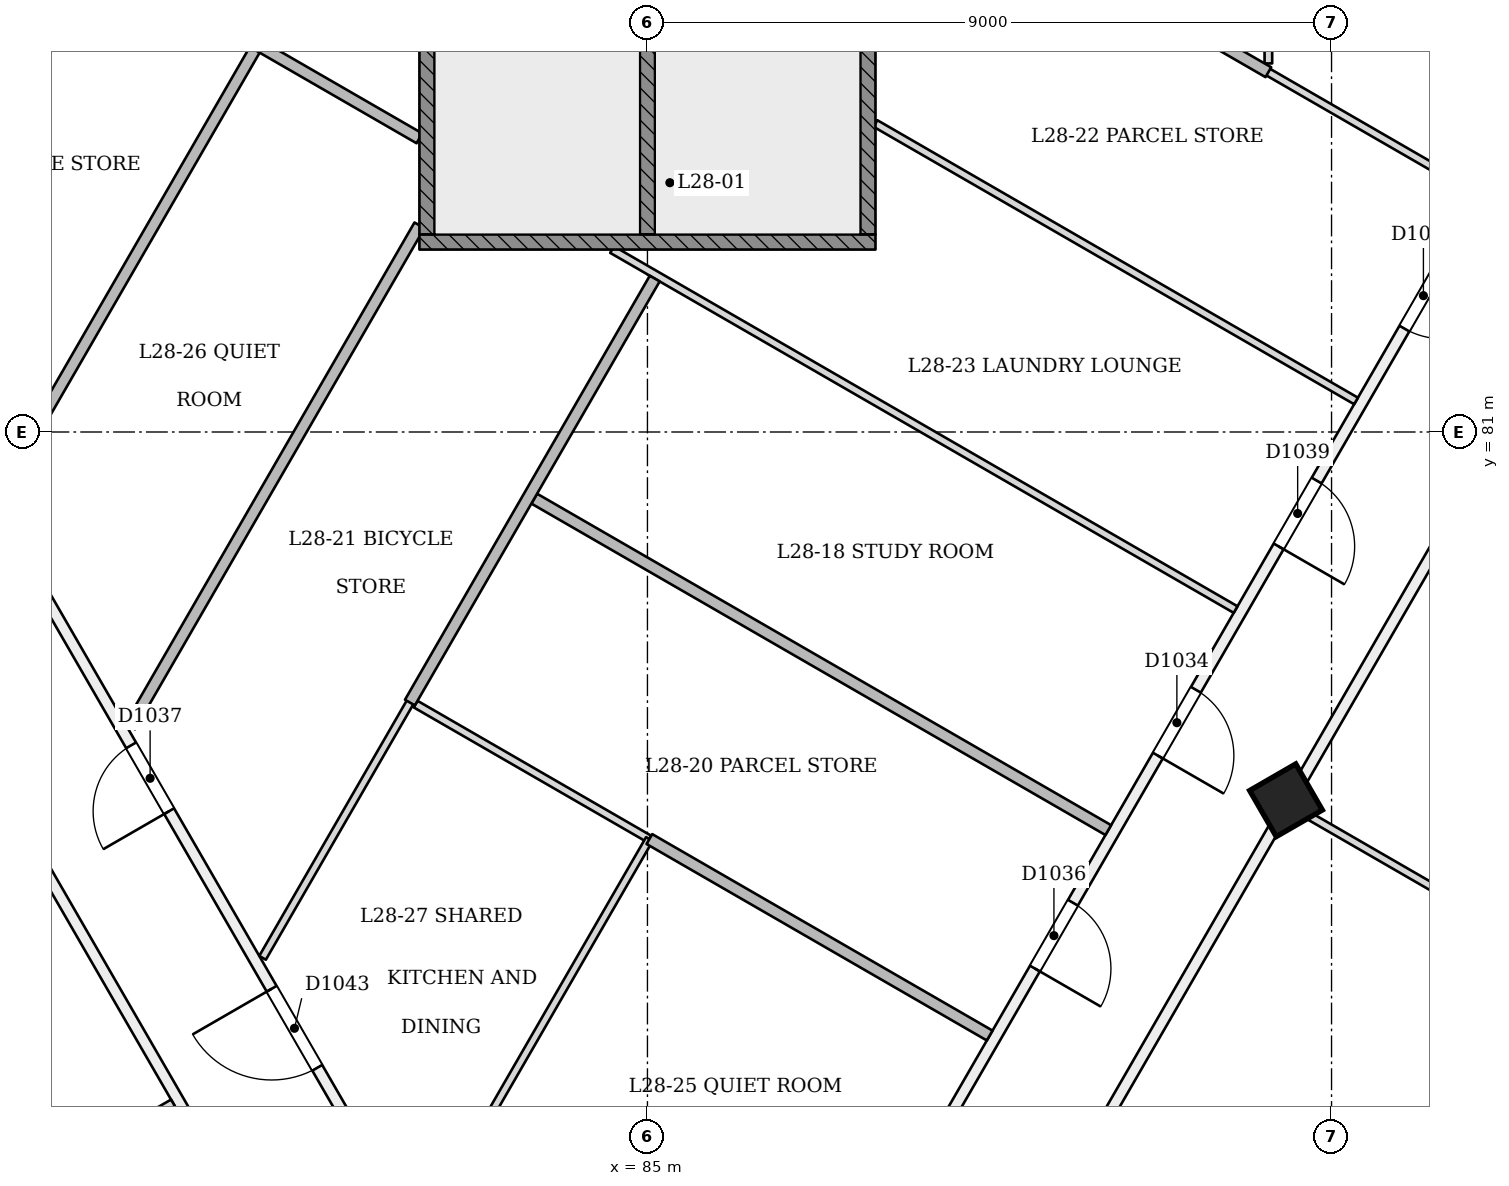
"""IFC4 building model, lengths in metres.
Left out: names, types, materials, properties, quantities, classifications, styles, units other than length and angle.
Written with IfcOpenShell. Run it as: python <this file> out.ifc"""

import sys

from ifc_helpers import new_model, si_unit, direction, frame, frame_2d, origin, origin_2d, place, context, subcontext, project, spatial, rectangle, extrude, element, fill, save


model = new_model("IFC4")
c1 = context("Model", 3, precision=1e-05, world=origin(), true_north=direction((0.0, 1.0)))
c2 = subcontext(c1, "Body", "Model", "MODEL_VIEW")
j1 = project(units=[si_unit("LENGTHUNIT", "METRE"), si_unit("PLANEANGLEUNIT", "RADIAN")], contexts=[c1])
p1 = place(None, origin())
s1 = spatial("IfcSite", under=j1, at=p1, CompositionType="ELEMENT")
p2 = place(p1, origin())
s2 = spatial("IfcBuilding", under=s1, at=p2, CompositionType="ELEMENT")
p3 = place(p2, frame((0.0, 0.0, 111.6)))
s3 = spatial("IfcBuildingStorey", under=s2, at=p3, CompositionType="ELEMENT", Elevation=111.6)
p4 = place(p3, frame((93.428, 76.108, -0.021), z_axis=(-0.02215519141, 0.038415882353, 0.999016199807), x_axis=(-0.50065279292, -0.865364153162, 0.02217348332)))
e1 = element("IfcColumn", 1, at=p4, inside=s3, PredefinedType="COLUMN", context=c2, shape_type="SweptSolid", body=[
    extrude(rectangle(XDim=0.7, YDim=0.7, at=origin_2d()), origin(), (0.0, 0.0, 1.0), 3.604),
])
p5 = place(p3, frame((99.716, 90.6, 0.0), z_axis=(0.0, 0.0, 1.0), x_axis=(-0.500001331159, -0.866024635238, 0.0)))
e2 = element("IfcWall", 2, at=p5, inside=s3, PredefinedType="PARTITIONING", context=c2, shape_type="SweptSolid", body=[
    extrude(rectangle(XDim=29.302, YDim=0.15, at=frame_2d((14.651, 0.0))), origin(), (0.0, 0.0, 1.0), 3.1),
])
p6 = place(p5, frame((2.192, 0.0, 0.0)))
e3 = element("IfcOpeningElement", 3, at=p6, cuts=e2, PredefinedType="OPENING", context=c2, shape_type="SweptSolid", body=[
    extrude(rectangle(XDim=0.9, YDim=2.1, at=frame_2d((0.45, 1.05))), frame((0.0, 0.085, 0.0), z_axis=(0.0, -1.0, 0.0), x_axis=(1.0, 0.0, 0.0)), (0.0, 0.0, 1.0), 0.171),
])
p7 = place(p5, frame((5.182, 0.0, 0.0)))
e4 = element("IfcOpeningElement", 4, at=p7, cuts=e2, PredefinedType="OPENING", context=c2, shape_type="SweptSolid", body=[
    extrude(rectangle(XDim=0.9, YDim=2.1, at=frame_2d((0.45, 1.05))), frame((0.0, 0.085, 0.0), z_axis=(0.0, -1.0, 0.0), x_axis=(1.0, 0.0, 0.0)), (0.0, 0.0, 1.0), 0.171),
])
p8 = place(p5, frame((15.001, 0.0, 0.0)))
e5 = element("IfcOpeningElement", 5, at=p8, cuts=e2, PredefinedType="OPENING", context=c2, shape_type="SweptSolid", body=[
    extrude(rectangle(XDim=1.0, YDim=2.1, at=frame_2d((0.5, 1.05))), frame((0.0, 0.085, 0.0), z_axis=(0.0, -1.0, 0.0), x_axis=(1.0, 0.0, 0.0)), (0.0, 0.0, 1.0), 0.171),
])
p9 = place(p5, frame((18.236, 0.0, 0.0)))
e6 = element("IfcOpeningElement", 6, at=p9, cuts=e2, PredefinedType="OPENING", context=c2, shape_type="SweptSolid", body=[
    extrude(rectangle(XDim=1.0, YDim=2.1, at=frame_2d((0.5, 1.05))), frame((0.0, 0.085, 0.0), z_axis=(0.0, -1.0, 0.0), x_axis=(1.0, 0.0, 0.0)), (0.0, 0.0, 1.0), 0.171),
])
p10 = place(p5, frame((8.514, 0.0, 0.0)))
e7 = element("IfcOpeningElement", 7, at=p10, cuts=e2, PredefinedType="OPENING", context=c2, shape_type="SweptSolid", body=[
    extrude(rectangle(XDim=1.0, YDim=2.1, at=frame_2d((0.5, 1.05))), frame((0.0, 0.085, 0.0), z_axis=(0.0, -1.0, 0.0), x_axis=(1.0, 0.0, 0.0)), (0.0, 0.0, 1.0), 0.171),
])
p11 = place(p5, frame((11.823, 0.0, 0.0)))
e8 = element("IfcOpeningElement", 8, at=p11, cuts=e2, PredefinedType="OPENING", context=c2, shape_type="SweptSolid", body=[
    extrude(rectangle(XDim=1.0, YDim=2.1, at=frame_2d((0.5, 1.05))), frame((0.0, 0.085, 0.0), z_axis=(0.0, -1.0, 0.0), x_axis=(1.0, 0.0, 0.0)), (0.0, 0.0, 1.0), 0.171),
])
p12 = place(p5, frame((22.054, 0.0, 0.0)))
e9 = element("IfcOpeningElement", 9, at=p12, cuts=e2, PredefinedType="OPENING", context=c2, shape_type="SweptSolid", body=[
    extrude(rectangle(XDim=1.0, YDim=2.1, at=frame_2d((0.5, 1.05))), frame((0.0, 0.085, 0.0), z_axis=(0.0, -1.0, 0.0), x_axis=(1.0, 0.0, 0.0)), (0.0, 0.0, 1.0), 0.171),
])
p13 = place(p3, frame((85.0, 65.112, 0.0), z_axis=(0.0, 0.0, 1.0), x_axis=(-0.499994117932, 0.866028799771, 0.0)))
e10 = element("IfcWall", 10, at=p13, inside=s3, PredefinedType="PARTITIONING", context=c2, shape_type="SweptSolid", body=[
    extrude(rectangle(XDim=29.431, YDim=0.15, at=frame_2d((14.716, 0.0))), origin(), (0.0, 0.0, 1.0), 3.1),
])
p14 = place(p13, frame((2.874, 0.0, 0.0)))
e11 = element("IfcOpeningElement", 11, at=p14, cuts=e10, PredefinedType="OPENING", context=c2, shape_type="SweptSolid", body=[
    extrude(rectangle(XDim=1.0, YDim=2.1, at=frame_2d((0.5, 1.05))), frame((0.0, 0.085, 0.0), z_axis=(0.0, -1.0, 0.0), x_axis=(1.0, 0.0, 0.0)), (0.0, 0.0, 1.0), 0.171),
])
p15 = place(p13, frame((25.015, 0.0, 0.0)))
e12 = element("IfcOpeningElement", 12, at=p15, cuts=e10, PredefinedType="OPENING", context=c2, shape_type="SweptSolid", body=[
    extrude(rectangle(XDim=1.0, YDim=2.1, at=frame_2d((0.5, 1.05))), frame((0.0, 0.085, 0.0), z_axis=(0.0, -1.0, 0.0), x_axis=(1.0, 0.0, 0.0)), (0.0, 0.0, 1.0), 0.171),
])
p16 = place(p13, frame((12.586, 0.0, 0.0)))
e13 = element("IfcOpeningElement", 13, at=p16, cuts=e10, PredefinedType="OPENING", context=c2, shape_type="SweptSolid", body=[
    extrude(rectangle(XDim=1.0, YDim=2.1, at=frame_2d((0.5, 1.05))), frame((0.0, 0.085, 0.0), z_axis=(0.0, -1.0, 0.0), x_axis=(1.0, 0.0, 0.0)), (0.0, 0.0, 1.0), 0.171),
])
p17 = place(p13, frame((20.422, 0.0, 0.0)))
e14 = element("IfcOpeningElement", 14, at=p17, cuts=e10, PredefinedType="OPENING", context=c2, shape_type="SweptSolid", body=[
    extrude(rectangle(XDim=1.0, YDim=2.1, at=frame_2d((0.5, 1.05))), frame((0.0, 0.085, 0.0), z_axis=(0.0, -1.0, 0.0), x_axis=(1.0, 0.0, 0.0)), (0.0, 0.0, 1.0), 0.171),
])
p18 = place(p13, frame((16.093, 0.0, 0.0)))
e15 = element("IfcOpeningElement", 15, at=p18, cuts=e10, PredefinedType="OPENING", context=c2, shape_type="SweptSolid", body=[
    extrude(rectangle(XDim=1.0, YDim=2.1, at=frame_2d((0.5, 1.05))), frame((0.0, 0.085, 0.0), z_axis=(0.0, -1.0, 0.0), x_axis=(1.0, 0.0, 0.0)), (0.0, 0.0, 1.0), 0.171),
])
p19 = place(p13, frame((8.688, 0.0, 0.0)))
e16 = element("IfcOpeningElement", 16, at=p19, cuts=e10, PredefinedType="OPENING", context=c2, shape_type="SweptSolid", body=[
    extrude(rectangle(XDim=1.2, YDim=2.1, at=frame_2d((0.6, 1.05))), frame((0.0, 0.085, 0.0), z_axis=(0.0, -1.0, 0.0), x_axis=(1.0, 0.0, 0.0)), (0.0, 0.0, 1.0), 0.171),
])
p20 = place(p3, frame((63.988, 97.906, 0.0), z_axis=(0.0, 0.0, 1.0), x_axis=(0.500001579174, -0.866024492046, 0.0)))
e17 = element("IfcWall", 17, at=p20, inside=s3, PredefinedType="PARTITIONING", context=c2, shape_type="SweptSolid", body=[
    extrude(rectangle(XDim=41.339, YDim=0.15, at=frame_2d((20.669, 0.0))), origin(), (0.0, 0.0, 1.0), 2.7),
])
p21 = place(p20, frame((0.228, 0.0, 0.0)))
e18 = element("IfcOpeningElement", 18, at=p21, cuts=e17, PredefinedType="OPENING", context=c2, shape_type="SweptSolid", body=[
    extrude(rectangle(XDim=1.2, YDim=2.1, at=frame_2d((0.6, 1.05))), frame((0.0, 0.085, 0.0), z_axis=(0.0, -1.0, 0.0), x_axis=(1.0, 0.0, 0.0)), (0.0, 0.0, 1.0), 0.171),
])
p22 = place(p20, frame((11.07, 0.0, 0.0)))
e19 = element("IfcOpeningElement", 19, at=p22, cuts=e17, PredefinedType="OPENING", context=c2, shape_type="SweptSolid", body=[
    extrude(rectangle(XDim=1.2, YDim=2.1, at=frame_2d((0.6, 1.05))), frame((0.0, 0.085, 0.0), z_axis=(0.0, -1.0, 0.0), x_axis=(1.0, 0.0, 0.0)), (0.0, 0.0, 1.0), 0.171),
])
p23 = place(p20, frame((22.32, 0.0, 0.0)))
e20 = element("IfcOpeningElement", 20, at=p23, cuts=e17, PredefinedType="OPENING", context=c2, shape_type="SweptSolid", body=[
    extrude(rectangle(XDim=1.2, YDim=2.1, at=frame_2d((0.6, 1.05))), frame((0.0, 0.085, 0.0), z_axis=(0.0, -1.0, 0.0), x_axis=(1.0, 0.0, 0.0)), (0.0, 0.0, 1.0), 0.171),
])
p24 = place(p20, frame((32.47, 0.0, 0.0)))
e21 = element("IfcOpeningElement", 21, at=p24, cuts=e17, PredefinedType="OPENING", context=c2, shape_type="SweptSolid", body=[
    extrude(rectangle(XDim=1.2, YDim=2.1, at=frame_2d((0.6, 1.05))), frame((0.0, 0.085, 0.0), z_axis=(0.0, -1.0, 0.0), x_axis=(1.0, 0.0, 0.0)), (0.0, 0.0, 1.0), 0.171),
])
p25 = place(p20, frame((39.758, 0.0, 0.0)))
e22 = element("IfcOpeningElement", 22, at=p25, cuts=e17, PredefinedType="OPENING", context=c2, shape_type="SweptSolid", body=[
    extrude(rectangle(XDim=1.0, YDim=2.1, at=frame_2d((0.5, 1.05))), frame((0.0, 0.085, 0.0), z_axis=(0.0, -1.0, 0.0), x_axis=(1.0, 0.0, 0.0)), (0.0, 0.0, 1.0), 0.171),
])
p26 = place(p3, frame((85.343, 62.105, 0.0), z_axis=(0.0, 0.0, 1.0), x_axis=(0.500001579174, 0.866024492046, 0.0)))
e23 = element("IfcWall", 23, at=p26, inside=s3, PredefinedType="PARTITIONING", context=c2, shape_type="SweptSolid", body=[
    extrude(rectangle(XDim=41.339, YDim=0.15, at=frame_2d((20.669, 0.0))), origin(), (0.0, 0.0, 1.0), 2.7),
])
p27 = place(p26, frame((0.312, 0.0, 0.0)))
e24 = element("IfcOpeningElement", 24, at=p27, cuts=e23, PredefinedType="OPENING", context=c2, shape_type="SweptSolid", body=[
    extrude(rectangle(XDim=1.2, YDim=2.1, at=frame_2d((0.6, 1.05))), frame((0.0, 0.085, 0.0), z_axis=(0.0, -1.0, 0.0), x_axis=(1.0, 0.0, 0.0)), (0.0, 0.0, 1.0), 0.171),
])
p28 = place(p26, frame((8.82, 0.0, 0.0)))
e25 = element("IfcOpeningElement", 25, at=p28, cuts=e23, PredefinedType="OPENING", context=c2, shape_type="SweptSolid", body=[
    extrude(rectangle(XDim=1.2, YDim=2.1, at=frame_2d((0.6, 1.05))), frame((0.0, 0.085, 0.0), z_axis=(0.0, -1.0, 0.0), x_axis=(1.0, 0.0, 0.0)), (0.0, 0.0, 1.0), 0.171),
])
p29 = place(p26, frame((22.32, 0.0, 0.0)))
e26 = element("IfcOpeningElement", 26, at=p29, cuts=e23, PredefinedType="OPENING", context=c2, shape_type="SweptSolid", body=[
    extrude(rectangle(XDim=1.2, YDim=2.1, at=frame_2d((0.6, 1.05))), frame((0.0, 0.085, 0.0), z_axis=(0.0, -1.0, 0.0), x_axis=(1.0, 0.0, 0.0)), (0.0, 0.0, 1.0), 0.171),
])
p30 = place(p26, frame((32.47, 0.0, 0.0)))
e27 = element("IfcOpeningElement", 27, at=p30, cuts=e23, PredefinedType="OPENING", context=c2, shape_type="SweptSolid", body=[
    extrude(rectangle(XDim=1.2, YDim=2.1, at=frame_2d((0.6, 1.05))), frame((0.0, 0.085, 0.0), z_axis=(0.0, -1.0, 0.0), x_axis=(1.0, 0.0, 0.0)), (0.0, 0.0, 1.0), 0.171),
])
p31 = place(p26, frame((39.739, 0.0, 0.0)))
e28 = element("IfcOpeningElement", 28, at=p31, cuts=e23, PredefinedType="OPENING", context=c2, shape_type="SweptSolid", body=[
    extrude(rectangle(XDim=1.0, YDim=2.1, at=frame_2d((0.5, 1.05))), frame((0.0, 0.085, 0.0), z_axis=(0.0, -1.0, 0.0), x_axis=(1.0, 0.0, 0.0)), (0.0, 0.0, 1.0), 0.171),
])
p32 = place(p3, frame((93.149, 85.745, 0.0), z_axis=(0.0, 0.0, 1.0), x_axis=(0.866050256499, -0.499956951366, 0.0)))
e29 = element("IfcWall", 29, at=p32, inside=s3, PredefinedType="PARTITIONING", context=c2, shape_type="SweptSolid", body=[
    extrude(rectangle(XDim=3.184, YDim=0.1, at=frame_2d((1.592, 0.0))), origin(), (0.0, 0.0, 1.0), 3.1),
])
p33 = place(p3, frame((93.169, 90.524, 0.0), z_axis=(0.0, 0.0, 1.0), x_axis=(0.0, -1.0, 0.0)))
e30 = element("IfcWall", 30, at=p33, inside=s3, PredefinedType="PARTITIONING", context=c2, shape_type="SweptSolid", body=[
    extrude(rectangle(XDim=4.676, YDim=0.1, at=frame_2d((2.338, 0.0))), origin(), (0.0, 0.0, 1.0), 3.1),
])
for number, where, z_axis, x_axis in (
    (31, (73.28, 69.012, 0.0), (0.0, 0.0, 1.0), (0.866, 0.5, 0.0)),
    (32, (98.97, 72.909, 0.0), (0.0, 0.0, 1.0), (-0.866, 0.5, 0.0)),
):
    element("IfcWall", number, at=place(p3, frame(where, z_axis=z_axis, x_axis=x_axis)), inside=s3, PredefinedType="PARTITIONING", context=c2, shape_type="SweptSolid", body=[
        extrude(rectangle(XDim=6.325, YDim=0.1, at=frame_2d((3.163, 0.0))), origin(), (0.0, 0.0, 1.0), 2.6),
    ])
p34 = place(p3, frame((83.51, 80.123, 0.0), z_axis=(0.0, 0.0, 1.0), x_axis=(0.866022412254, -0.500005181446, 0.0)))
e33 = element("IfcWall", 33, at=p34, inside=s3, PredefinedType="PARTITIONING", context=c2, shape_type="SweptSolid", body=[
    extrude(rectangle(XDim=8.721, YDim=0.15, at=frame_2d((4.36, 0.0))), origin(), (0.0, 0.0, 1.0), 3.1),
])
p35 = place(p3, frame((85.096, 83.019, 0.0), z_axis=(0.0, 0.0, 1.0), x_axis=(-0.499991501415, -0.866030310389, 0.0)))
e34 = element("IfcWall", 34, at=p35, inside=s3, PredefinedType="PARTITIONING", context=c2, shape_type="SweptSolid", body=[
    extrude(rectangle(XDim=6.441, YDim=0.15, at=frame_2d((3.22, 0.0))), origin(), (0.0, 0.0, 1.0), 3.1),
])
p36 = place(p3, frame((92.738, 78.664, 0.0), z_axis=(0.0, 0.0, 1.0), x_axis=(-0.866036218949, 0.499981267118, 0.0)))
e35 = element("IfcWall", 35, at=p36, inside=s3, PredefinedType="PARTITIONING", context=c2, shape_type="SweptSolid", body=[
    extrude(rectangle(XDim=9.472, YDim=0.1, at=frame_2d((4.736, 0.0))), origin(), (0.0, 0.0, 1.0), 3.1),
])
p37 = place(p3, frame((76.315, 88.146, 0.0), z_axis=(0.0, 0.0, 1.0), x_axis=(0.866025784966, -0.499999339774, 0.0)))
e36 = element("IfcWall", 36, at=p37, inside=s3, PredefinedType="PARTITIONING", context=c2, shape_type="SweptSolid", body=[
    extrude(rectangle(XDim=6.564, YDim=0.15, at=frame_2d((3.282, 0.0))), origin(), (0.0, 0.0, 1.0), 3.1),
])
p38 = place(p3, frame((85.025, 75.645, 0.0), z_axis=(0.0, 0.0, 1.0), x_axis=(0.866034590324, -0.49998408811, 0.0)))
e37 = element("IfcWall", 37, at=p38, inside=s3, PredefinedType="PARTITIONING", context=c2, shape_type="SweptSolid", body=[
    extrude(rectangle(XDim=5.17, YDim=0.15, at=frame_2d((2.585, 0.0))), origin(), (0.0, 0.0, 1.0), 3.1),
])
p39 = place(p3, frame((81.95, 77.42, 0.0), z_axis=(0.0, 0.0, 1.0), x_axis=(0.866004682396, -0.50003588878, 0.0)))
e38 = element("IfcWall", 38, at=p39, inside=s3, PredefinedType="PARTITIONING", context=c2, shape_type="SweptSolid", body=[
    extrude(rectangle(XDim=3.551, YDim=0.1, at=frame_2d((1.775, 0.0))), origin(), (0.0, 0.0, 1.0), 3.1),
])
p40 = place(p3, frame((82.0, 83.719, 0.0), z_axis=(0.0, 0.0, 1.0), x_axis=(-0.499991725642, -0.866030180935, 0.0)))
e39 = element("IfcWall", 39, at=p40, inside=s3, PredefinedType="PARTITIONING", context=c2, shape_type="SweptSolid", body=[
    extrude(rectangle(XDim=7.613, YDim=0.15, at=frame_2d((3.807, 0.0))), origin(), (0.0, 0.0, 1.0), 3.1),
])
p41 = place(p3, frame((79.936, 74.082, 0.0), z_axis=(0.0, 0.0, 1.0), x_axis=(0.50002608053, 0.86601034566, 0.0)))
e40 = element("IfcWall", 40, at=p41, inside=s3, PredefinedType="PARTITIONING", context=c2, shape_type="SweptSolid", body=[
    extrude(rectangle(XDim=3.898, YDim=0.1, at=frame_2d((1.949, 0.0))), origin(), (0.0, 0.0, 1.0), 3.1),
])
p42 = place(p3, frame((88.0, 85.059, 0.0), z_axis=(0.0, 0.0, 1.0), x_axis=(0.866026309874, -0.499998430604, 0.0)))
e41 = element("IfcWall", 41, at=p42, inside=s3, PredefinedType="PARTITIONING", context=c2, shape_type="SweptSolid", body=[
    extrude(rectangle(XDim=7.3, YDim=0.1, at=frame_2d((3.65, 0.0))), origin(), (0.0, 0.0, 1.0), 3.1),
])
p43 = place(p3, frame((93.169, 85.733, 0.0), z_axis=(0.0, 0.0, 1.0), x_axis=(-0.866019379875, 0.500010433572, 0.0)))
e42 = element("IfcWall", 42, at=p43, inside=s3, PredefinedType="PARTITIONING", context=c2, shape_type="SweptSolid", body=[
    extrude(rectangle(XDim=5.969, YDim=0.15, at=frame_2d((2.984, 0.0))), origin(), (0.0, 0.0, 1.0), 3.1),
])
p44 = place(p3, frame((76.443, 80.157, 0.0), z_axis=(0.0, 0.0, 1.0), x_axis=(0.500012372684, 0.866018260294, 0.0)))
e43 = element("IfcWall", 43, at=p44, inside=s3, PredefinedType="PARTITIONING", context=c2, shape_type="SweptSolid", body=[
    extrude(rectangle(XDim=6.779, YDim=0.15, at=frame_2d((3.39, 0.0))), origin(), (0.0, 0.0, 1.0), 3.1),
])
p45 = place(p3, frame((85.025, 75.645, 0.0), z_axis=(0.0, 0.0, 1.0), x_axis=(-0.500004647933, -0.866022720283, 0.0)))
e44 = element("IfcWall", 44, at=p45, inside=s3, PredefinedType="PARTITIONING", context=c2, shape_type="SweptSolid", body=[
    extrude(rectangle(XDim=5.991, YDim=0.1, at=frame_2d((2.996, 0.0))), origin(), (0.0, 0.0, 1.0), 3.1),
])
p46 = place(p3, frame((82.0, 83.5, 0.0), z_axis=(0.0, 0.0, 1.0), x_axis=(1.0, 0.0, 0.0)))
e45 = element("IfcWall", 45, at=p46, inside=s3, PredefinedType="SOLIDWALL", context=c2, shape_type="SweptSolid", body=[
    extrude(rectangle(XDim=6.0, YDim=0.2, at=frame_2d((3.0, 0.0))), origin(), (0.0, 0.0, 1.0), 3.1),
])
for number, where, z_axis, x_axis in (
    (46, (82.1, 83.6, 0.0), (0.0, 0.0, 1.0), (0.0, 1.0, 0.0)),
    (47, (87.9, 83.6, 0.0), (0.0, 0.0, 1.0), (0.0, 1.0, 0.0)),
    (48, (85.0, 83.6, 0.0), (0.0, 0.0, 1.0), (0.0, 1.0, 0.0)),
):
    element("IfcWall", number, at=place(p3, frame(where, z_axis=z_axis, x_axis=x_axis)), inside=s3, PredefinedType="SOLIDWALL", context=c2, shape_type="SweptSolid", body=[
        extrude(rectangle(XDim=6.8, YDim=0.2, at=frame_2d((3.4, 0.0))), origin(), (0.0, 0.0, 1.0), 3.1),
    ])
p47 = place(p8, origin())
e49 = element("IfcDoor", 49, at=p47, inside=s3, OperationType="SINGLE_SWING_RIGHT", PredefinedType="NOTDEFINED", context=c2, shape_type="SweptSolid", body=[
    extrude(rectangle(XDim=1.0, YDim=2.1, at=frame_2d((0.5, 1.05))), frame((0.0, 0.025, 0.0), z_axis=(0.0, -1.0, 0.0), x_axis=(1.0, 0.0, 0.0)), (0.0, 0.0, 1.0), 0.05),
])
fill(e5, e49)
p48 = place(p9, origin())
e50 = element("IfcDoor", 50, at=p48, inside=s3, OperationType="SINGLE_SWING_RIGHT", PredefinedType="NOTDEFINED", context=c2, shape_type="SweptSolid", body=[
    extrude(rectangle(XDim=1.0, YDim=2.1, at=frame_2d((0.5, 1.05))), frame((0.0, 0.025, 0.0), z_axis=(0.0, -1.0, 0.0), x_axis=(1.0, 0.0, 0.0)), (0.0, 0.0, 1.0), 0.05),
])
fill(e6, e50)
p49 = place(p16, origin())
e51 = element("IfcDoor", 51, at=p49, inside=s3, OperationType="SINGLE_SWING_LEFT", PredefinedType="NOTDEFINED", context=c2, shape_type="SweptSolid", body=[
    extrude(rectangle(XDim=1.0, YDim=2.1, at=frame_2d((0.5, 1.05))), frame((0.0, 0.025, 0.0), z_axis=(0.0, -1.0, 0.0), x_axis=(1.0, 0.0, 0.0)), (0.0, 0.0, 1.0), 0.05),
])
fill(e13, e51)
p50 = place(p10, origin())
e52 = element("IfcDoor", 52, at=p50, inside=s3, OperationType="SINGLE_SWING_LEFT", PredefinedType="NOTDEFINED", context=c2, shape_type="SweptSolid", body=[
    extrude(rectangle(XDim=1.0, YDim=2.1, at=frame_2d((0.5, 1.05))), frame((0.0, 0.025, 0.0), z_axis=(0.0, -1.0, 0.0), x_axis=(1.0, 0.0, 0.0)), (0.0, 0.0, 1.0), 0.05),
])
fill(e7, e52)
p51 = place(p11, origin())
e53 = element("IfcDoor", 53, at=p51, inside=s3, OperationType="SINGLE_SWING_RIGHT", PredefinedType="NOTDEFINED", context=c2, shape_type="SweptSolid", body=[
    extrude(rectangle(XDim=1.0, YDim=2.1, at=frame_2d((0.5, 1.05))), frame((0.0, 0.025, 0.0), z_axis=(0.0, -1.0, 0.0), x_axis=(1.0, 0.0, 0.0)), (0.0, 0.0, 1.0), 0.05),
])
fill(e8, e53)
p52 = place(p19, origin())
e54 = element("IfcDoor", 54, at=p52, inside=s3, OperationType="SINGLE_SWING_RIGHT", PredefinedType="NOTDEFINED", context=c2, shape_type="SweptSolid", body=[
    extrude(rectangle(XDim=1.2, YDim=2.1, at=frame_2d((0.6, 1.05))), frame((0.0, 0.025, 0.0), z_axis=(0.0, -1.0, 0.0), x_axis=(1.0, 0.0, 0.0)), (0.0, 0.0, 1.0), 0.05),
])
fill(e16, e54)
save(model, sys.argv[1])
